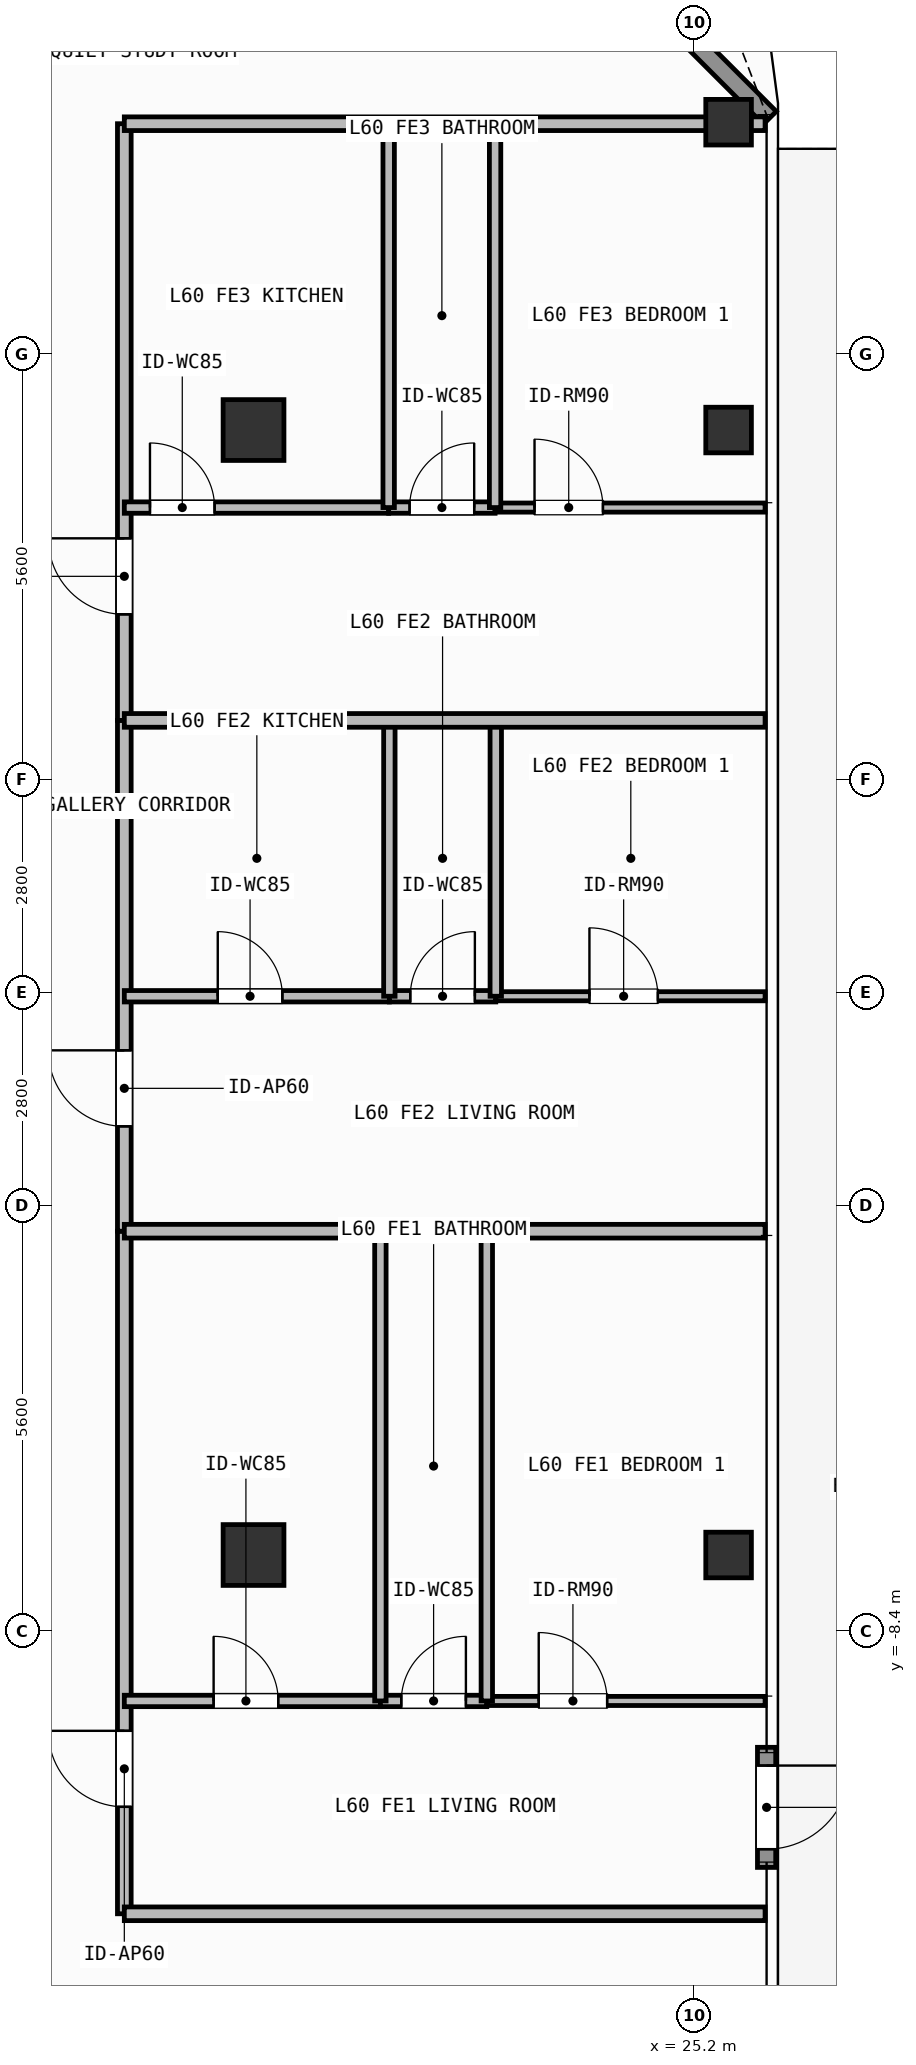
"""IFC4 building model, lengths in metres.
Left out: names, types, materials, properties, quantities, classifications, styles, units other than length and angle.
Written with IfcOpenShell. Run it as: python <this file> out.ifc"""

import sys

from ifc_helpers import new_model, si_unit, direction, frame, frame_2d, origin, origin_2d, place, context, subcontext, project, spatial, rectangle, hollow_rectangle, extrude, element, fill, save


model = new_model("IFC4")
c1 = context("Model", 3, precision=1e-05, world=origin(), true_north=direction((0.0, 1.0)))
c2 = subcontext(c1, "Body", "Model", "MODEL_VIEW")
j1 = project(units=[si_unit("LENGTHUNIT", "METRE"), si_unit("PLANEANGLEUNIT", "RADIAN")], contexts=[c1])
p1 = place(None, origin())
s1 = spatial("IfcSite", under=j1, at=p1, CompositionType="ELEMENT")
p2 = place(p1, origin())
s2 = spatial("IfcBuilding", under=s1, at=p2, CompositionType="ELEMENT")
p3 = place(p2, frame((0.0, 0.0, 246.9)))
s3 = spatial("IfcBuildingStorey", under=s2, at=p3, CompositionType="ELEMENT", Elevation=246.9)
for number, where, z_axis, x_axis in (
    (1, (19.4, -7.4, 0.0), (0.0, 0.0, 1.0), (1.0, 0.0, 0.0)),
    (2, (19.4, 7.4, 0.0), (0.0, 0.0, 1.0), (1.0, 0.0, 0.0)),
):
    element("IfcColumn", number, at=place(p3, frame(where, z_axis=z_axis, x_axis=x_axis)), inside=s3, PredefinedType="COLUMN", context=c2, shape_type="SweptSolid", body=[
        extrude(hollow_rectangle(XDim=0.8, YDim=0.8, WallThickness=0.036, at=origin_2d()), origin(), (0.0, 0.0, 1.0), 3.9),
    ])
for number, where, z_axis, x_axis in (
    (3, (25.65, 11.45, 0.0), (0.0, 0.0, 1.0), (1.0, 0.0, 0.0)),
    (4, (25.65, -7.4, 0.0), (0.0, 0.0, 1.0), (1.0, 0.0, 0.0)),
    (5, (25.65, 7.4, 0.0), (0.0, 0.0, 1.0), (1.0, 0.0, 0.0)),
):
    element("IfcColumn", number, at=place(p3, frame(where, z_axis=z_axis, x_axis=x_axis)), inside=s3, PredefinedType="COLUMN", context=c2, shape_type="SweptSolid", body=[
        extrude(hollow_rectangle(XDim=0.6, YDim=0.6, WallThickness=0.028, at=origin_2d()), origin(), (0.0, 0.0, 1.0), 3.9),
    ])
p4 = place(p3, frame((26.15, -9.93, 0.0), z_axis=(0.0, 0.0, 1.0), x_axis=(0.0, -1.0, 0.0)))
e6 = element("IfcWall", 6, at=p4, inside=s3, PredefinedType="SOLIDWALL", context=c2, shape_type="SweptSolid", body=[
    extrude(rectangle(XDim=1.58, YDim=0.24, at=frame_2d((0.79, 0.0))), origin(), (0.0, 0.0, 1.0), 3.68),
])
p5 = place(p4, frame((0.24, 0.0, 0.0)))
e7 = element("IfcOpeningElement", 7, at=p5, cuts=e6, PredefinedType="OPENING", context=c2, shape_type="SweptSolid", body=[
    extrude(rectangle(XDim=1.1, YDim=2.2, at=frame_2d((0.55, 1.1))), frame((0.0, 0.13, 0.0), z_axis=(0.0, -1.0, 0.0), x_axis=(1.0, 0.0, 0.0)), (0.0, 0.0, 1.0), 0.26),
])
p6 = place(p3, frame((21.808, 15.892, 0.0), z_axis=(0.0, 0.0, 1.0), x_axis=(0.707106781187, -0.707106781187, 0.0)))
e8 = element("IfcWall", 8, at=p6, inside=s3, PredefinedType="SOLIDWALL", context=c2, shape_type="SweptSolid", body=[
    extrude(rectangle(XDim=6.201, YDim=0.24, at=frame_2d((3.101, 0.0))), origin(), (0.0, 0.0, 1.0), 3.68),
])
p7 = place(p3, frame((17.7, -12.12, 0.0), z_axis=(0.0, 0.0, 1.0), x_axis=(0.0, 1.0, 0.0)))
e9 = element("IfcWall", 9, at=p7, inside=s3, PredefinedType="PARTITIONING", context=c2, shape_type="SweptSolid", body=[
    extrude(rectangle(XDim=8.98, YDim=0.18, at=frame_2d((4.49, 0.0))), origin(), (0.0, 0.0, 1.0), 3.68),
])
p8 = place(p7, frame((1.407, 0.0, 0.0)))
e10 = element("IfcOpeningElement", 10, at=p8, cuts=e9, PredefinedType="OPENING", context=c2, shape_type="SweptSolid", body=[
    extrude(rectangle(XDim=1.0, YDim=2.2, at=frame_2d((0.5, 1.1))), frame((0.0, 0.1, 0.0), z_axis=(0.0, -1.0, 0.0), x_axis=(1.0, 0.0, 0.0)), (0.0, 0.0, 1.0), 0.2),
])
p9 = place(p3, frame((17.7, -9.32, 0.0), z_axis=(0.0, 0.0, 1.0), x_axis=(1.0, 0.0, 0.0)))
e11 = element("IfcWall", 11, at=p9, inside=s3, PredefinedType="PARTITIONING", context=c2, shape_type="SweptSolid", body=[
    extrude(rectangle(XDim=3.369, YDim=0.15, at=frame_2d((1.685, 0.0))), origin(), (0.0, 0.0, 1.0), 3.68),
])
p10 = place(p9, frame((1.175, 0.0, 0.0)))
e12 = element("IfcOpeningElement", 12, at=p10, cuts=e11, PredefinedType="OPENING", context=c2, shape_type="SweptSolid", body=[
    extrude(rectangle(XDim=0.85, YDim=2.1, at=frame_2d((0.425, 1.05))), frame((0.0, 0.085, 0.0), z_axis=(0.0, -1.0, 0.0), x_axis=(1.0, 0.0, 0.0)), (0.0, 0.0, 1.0), 0.17),
])
p11 = place(p3, frame((21.069, -9.32, 0.0), z_axis=(0.0, 0.0, 1.0), x_axis=(1.0, 0.0, 0.0)))
e13 = element("IfcWall", 13, at=p11, inside=s3, PredefinedType="PARTITIONING", context=c2, shape_type="SweptSolid", body=[
    extrude(rectangle(XDim=1.4, YDim=0.15, at=frame_2d((0.7, 0.0))), origin(), (0.0, 0.0, 1.0), 3.68),
])
p12 = place(p11, frame((0.275, 0.0, 0.0)))
e14 = element("IfcOpeningElement", 14, at=p12, cuts=e13, PredefinedType="OPENING", context=c2, shape_type="SweptSolid", body=[
    extrude(rectangle(XDim=0.85, YDim=2.1, at=frame_2d((0.425, 1.05))), frame((0.0, 0.085, 0.0), z_axis=(0.0, -1.0, 0.0), x_axis=(1.0, 0.0, 0.0)), (0.0, 0.0, 1.0), 0.17),
])
p13 = place(p3, frame((22.469, -9.32, 0.0), z_axis=(0.0, 0.0, 1.0), x_axis=(1.0, 0.0, 0.0)))
e15 = element("IfcWall", 15, at=p13, inside=s3, PredefinedType="PARTITIONING", context=c2, shape_type="SweptSolid", body=[
    extrude(rectangle(XDim=3.661, YDim=0.12, at=frame_2d((1.831, 0.0))), origin(), (0.0, 0.0, 1.0), 3.68),
])
p14 = place(p13, frame((0.683, 0.0, 0.0)))
e16 = element("IfcOpeningElement", 16, at=p14, cuts=e15, PredefinedType="OPENING", context=c2, shape_type="SweptSolid", body=[
    extrude(rectangle(XDim=0.9, YDim=2.1, at=frame_2d((0.45, 1.05))), frame((0.0, 0.07, 0.0), z_axis=(0.0, -1.0, 0.0), x_axis=(1.0, 0.0, 0.0)), (0.0, 0.0, 1.0), 0.14),
])
p15 = place(p3, frame((17.7, -3.14, 0.0), z_axis=(0.0, 0.0, 1.0), x_axis=(0.0, 1.0, 0.0)))
e17 = element("IfcWall", 17, at=p15, inside=s3, PredefinedType="PARTITIONING", context=c2, shape_type="SweptSolid", body=[
    extrude(rectangle(XDim=6.72, YDim=0.18, at=frame_2d((3.36, 0.0))), origin(), (0.0, 0.0, 1.0), 3.68),
])
p16 = place(p15, frame((1.379, 0.0, 0.0)))
e18 = element("IfcOpeningElement", 18, at=p16, cuts=e17, PredefinedType="OPENING", context=c2, shape_type="SweptSolid", body=[
    extrude(rectangle(XDim=1.0, YDim=2.2, at=frame_2d((0.5, 1.1))), frame((0.0, 0.1, 0.0), z_axis=(0.0, -1.0, 0.0), x_axis=(1.0, 0.0, 0.0)), (0.0, 0.0, 1.0), 0.2),
])
p17 = place(p3, frame((17.7, -0.049, 0.0), z_axis=(0.0, 0.0, 1.0), x_axis=(1.0, 0.0, 0.0)))
e19 = element("IfcWall", 19, at=p17, inside=s3, PredefinedType="PARTITIONING", context=c2, shape_type="SweptSolid", body=[
    extrude(rectangle(XDim=3.487, YDim=0.15, at=frame_2d((1.744, 0.0))), origin(), (0.0, 0.0, 1.0), 3.68),
])
p18 = place(p17, frame((1.229, 0.0, 0.0)))
e20 = element("IfcOpeningElement", 20, at=p18, cuts=e19, PredefinedType="OPENING", context=c2, shape_type="SweptSolid", body=[
    extrude(rectangle(XDim=0.85, YDim=2.1, at=frame_2d((0.425, 1.05))), frame((0.0, 0.085, 0.0), z_axis=(0.0, -1.0, 0.0), x_axis=(1.0, 0.0, 0.0)), (0.0, 0.0, 1.0), 0.17),
])
p19 = place(p3, frame((21.187, -0.049, 0.0), z_axis=(0.0, 0.0, 1.0), x_axis=(1.0, 0.0, 0.0)))
e21 = element("IfcWall", 21, at=p19, inside=s3, PredefinedType="PARTITIONING", context=c2, shape_type="SweptSolid", body=[
    extrude(rectangle(XDim=1.4, YDim=0.15, at=frame_2d((0.7, 0.0))), origin(), (0.0, 0.0, 1.0), 3.68),
])
p20 = place(p19, frame((0.275, 0.0, 0.0)))
e22 = element("IfcOpeningElement", 22, at=p20, cuts=e21, PredefinedType="OPENING", context=c2, shape_type="SweptSolid", body=[
    extrude(rectangle(XDim=0.85, YDim=2.1, at=frame_2d((0.425, 1.05))), frame((0.0, 0.085, 0.0), z_axis=(0.0, -1.0, 0.0), x_axis=(1.0, 0.0, 0.0)), (0.0, 0.0, 1.0), 0.17),
])
p21 = place(p3, frame((22.587, -0.049, 0.0), z_axis=(0.0, 0.0, 1.0), x_axis=(1.0, 0.0, 0.0)))
e23 = element("IfcWall", 23, at=p21, inside=s3, PredefinedType="PARTITIONING", context=c2, shape_type="SweptSolid", body=[
    extrude(rectangle(XDim=3.543, YDim=0.12, at=frame_2d((1.771, 0.0))), origin(), (0.0, 0.0, 1.0), 3.68),
])
p22 = place(p21, frame((1.232, 0.0, 0.0)))
e24 = element("IfcOpeningElement", 24, at=p22, cuts=e23, PredefinedType="OPENING", context=c2, shape_type="SweptSolid", body=[
    extrude(rectangle(XDim=0.9, YDim=2.1, at=frame_2d((0.45, 1.05))), frame((0.0, 0.07, 0.0), z_axis=(0.0, -1.0, 0.0), x_axis=(1.0, 0.0, 0.0)), (0.0, 0.0, 1.0), 0.14),
])
p23 = place(p3, frame((17.7, 3.58, 0.0), z_axis=(0.0, 0.0, 1.0), x_axis=(0.0, 1.0, 0.0)))
e25 = element("IfcWall", 25, at=p23, inside=s3, PredefinedType="PARTITIONING", context=c2, shape_type="SweptSolid", body=[
    extrude(rectangle(XDim=7.85, YDim=0.18, at=frame_2d((3.925, 0.0))), origin(), (0.0, 0.0, 1.0), 3.68),
])
p24 = place(p23, frame((1.396, 0.0, 0.0)))
e26 = element("IfcOpeningElement", 26, at=p24, cuts=e25, PredefinedType="OPENING", context=c2, shape_type="SweptSolid", body=[
    extrude(rectangle(XDim=1.0, YDim=2.2, at=frame_2d((0.5, 1.1))), frame((0.0, 0.1, 0.0), z_axis=(0.0, -1.0, 0.0), x_axis=(1.0, 0.0, 0.0)), (0.0, 0.0, 1.0), 0.2),
])
p25 = place(p3, frame((17.7, 6.38, 0.0), z_axis=(0.0, 0.0, 1.0), x_axis=(1.0, 0.0, 0.0)))
e27 = element("IfcWall", 27, at=p25, inside=s3, PredefinedType="PARTITIONING", context=c2, shape_type="SweptSolid", body=[
    extrude(rectangle(XDim=3.478, YDim=0.15, at=frame_2d((1.739, 0.0))), origin(), (0.0, 0.0, 1.0), 3.68),
])
p26 = place(p25, frame((0.337, 0.0, 0.0)))
e28 = element("IfcOpeningElement", 28, at=p26, cuts=e27, PredefinedType="OPENING", context=c2, shape_type="SweptSolid", body=[
    extrude(rectangle(XDim=0.85, YDim=2.1, at=frame_2d((0.425, 1.05))), frame((0.0, 0.085, 0.0), z_axis=(0.0, -1.0, 0.0), x_axis=(1.0, 0.0, 0.0)), (0.0, 0.0, 1.0), 0.17),
])
p27 = place(p3, frame((21.178, 6.38, 0.0), z_axis=(0.0, 0.0, 1.0), x_axis=(1.0, 0.0, 0.0)))
e29 = element("IfcWall", 29, at=p27, inside=s3, PredefinedType="PARTITIONING", context=c2, shape_type="SweptSolid", body=[
    extrude(rectangle(XDim=1.4, YDim=0.15, at=frame_2d((0.7, 0.0))), origin(), (0.0, 0.0, 1.0), 3.68),
])
p28 = place(p27, frame((0.275, 0.0, 0.0)))
e30 = element("IfcOpeningElement", 30, at=p28, cuts=e29, PredefinedType="OPENING", context=c2, shape_type="SweptSolid", body=[
    extrude(rectangle(XDim=0.85, YDim=2.1, at=frame_2d((0.425, 1.05))), frame((0.0, 0.085, 0.0), z_axis=(0.0, -1.0, 0.0), x_axis=(1.0, 0.0, 0.0)), (0.0, 0.0, 1.0), 0.17),
])
p29 = place(p3, frame((22.578, 6.38, 0.0), z_axis=(0.0, 0.0, 1.0), x_axis=(1.0, 0.0, 0.0)))
e31 = element("IfcWall", 31, at=p29, inside=s3, PredefinedType="PARTITIONING", context=c2, shape_type="SweptSolid", body=[
    extrude(rectangle(XDim=3.552, YDim=0.12, at=frame_2d((1.776, 0.0))), origin(), (0.0, 0.0, 1.0), 3.68),
])
p30 = place(p29, frame((0.519, 0.0, 0.0)))
e32 = element("IfcOpeningElement", 32, at=p30, cuts=e31, PredefinedType="OPENING", context=c2, shape_type="SweptSolid", body=[
    extrude(rectangle(XDim=0.9, YDim=2.1, at=frame_2d((0.45, 1.05))), frame((0.0, 0.07, 0.0), z_axis=(0.0, -1.0, 0.0), x_axis=(1.0, 0.0, 0.0)), (0.0, 0.0, 1.0), 0.14),
])
for number, where, z_axis, x_axis in (
    (33, (21.069, -9.32, 0.0), (0.0, 0.0, 1.0), (0.0, 1.0, 0.0)),
    (34, (22.469, -9.32, 0.0), (0.0, 0.0, 1.0), (0.0, 1.0, 0.0)),
):
    element("IfcWall", number, at=place(p3, frame(where, z_axis=z_axis, x_axis=x_axis)), inside=s3, PredefinedType="PARTITIONING", context=c2, shape_type="SweptSolid", body=[
        extrude(rectangle(XDim=6.18, YDim=0.15, at=frame_2d((3.09, 0.0))), origin(), (0.0, 0.0, 1.0), 3.68),
    ])
for number, where, z_axis, x_axis in (
    (35, (21.187, -0.049, 0.0), (0.0, 0.0, 1.0), (0.0, 1.0, 0.0)),
    (36, (22.587, -0.049, 0.0), (0.0, 0.0, 1.0), (0.0, 1.0, 0.0)),
):
    element("IfcWall", number, at=place(p3, frame(where, z_axis=z_axis, x_axis=x_axis)), inside=s3, PredefinedType="PARTITIONING", context=c2, shape_type="SweptSolid", body=[
        extrude(rectangle(XDim=3.629, YDim=0.15, at=frame_2d((1.814, 0.0))), origin(), (0.0, 0.0, 1.0), 3.68),
    ])
p31 = place(p3, frame((17.7, -3.14, 0.0), z_axis=(0.0, 0.0, 1.0), x_axis=(1.0, 0.0, 0.0)))
e37 = element("IfcWall", 37, at=p31, inside=s3, PredefinedType="PARTITIONING", context=c2, shape_type="SweptSolid", body=[
    extrude(rectangle(XDim=8.43, YDim=0.18, at=frame_2d((4.215, 0.0))), origin(), (0.0, 0.0, 1.0), 3.68),
])
for number, where, z_axis, x_axis in (
    (38, (21.178, 6.38, 0.0), (0.0, 0.0, 1.0), (0.0, 1.0, 0.0)),
    (39, (22.578, 6.38, 0.0), (0.0, 0.0, 1.0), (0.0, 1.0, 0.0)),
):
    element("IfcWall", number, at=place(p3, frame(where, z_axis=z_axis, x_axis=x_axis)), inside=s3, PredefinedType="PARTITIONING", context=c2, shape_type="SweptSolid", body=[
        extrude(rectangle(XDim=5.05, YDim=0.15, at=frame_2d((2.525, 0.0))), origin(), (0.0, 0.0, 1.0), 3.68),
    ])
for number, where, z_axis, x_axis in (
    (40, (17.7, 3.58, 0.0), (0.0, 0.0, 1.0), (1.0, 0.0, 0.0)),
    (41, (17.7, -12.12, 0.0), (0.0, 0.0, 1.0), (1.0, 0.0, 0.0)),
):
    element("IfcWall", number, at=place(p3, frame(where, z_axis=z_axis, x_axis=x_axis)), inside=s3, PredefinedType="PARTITIONING", context=c2, shape_type="SweptSolid", body=[
        extrude(rectangle(XDim=8.43, YDim=0.18, at=frame_2d((4.215, 0.0))), origin(), (0.0, 0.0, 1.0), 3.68),
    ])
p32 = place(p3, frame((17.7, 11.43, 0.0), z_axis=(0.0, 0.0, 1.0), x_axis=(1.0, 0.0, 0.0)))
e42 = element("IfcWall", 42, at=p32, inside=s3, PredefinedType="PARTITIONING", context=c2, shape_type="SweptSolid", body=[
    extrude(rectangle(XDim=8.43, YDim=0.18, at=frame_2d((4.215, 0.0))), origin(), (0.0, 0.0, 1.0), 3.42),
])
p33 = place(p5, origin())
e43 = element("IfcDoor", 43, at=p33, inside=s3, OperationType="SINGLE_SWING_LEFT", PredefinedType="DOOR", context=c2, shape_type="SweptSolid", body=[
    extrude(rectangle(XDim=1.1, YDim=2.2, at=frame_2d((0.55, 1.1))), frame((0.0, 0.025, 0.0), z_axis=(0.0, -1.0, 0.0), x_axis=(1.0, 0.0, 0.0)), (0.0, 0.0, 1.0), 0.05),
])
fill(e7, e43)
p34 = place(p8, origin())
e44 = element("IfcDoor", 44, at=p34, inside=s3, OperationType="SINGLE_SWING_RIGHT", PredefinedType="DOOR", context=c2, shape_type="SweptSolid", body=[
    extrude(rectangle(XDim=1.0, YDim=2.2, at=frame_2d((0.5, 1.1))), frame((0.0, 0.025, 0.0), z_axis=(0.0, -1.0, 0.0), x_axis=(1.0, 0.0, 0.0)), (0.0, 0.0, 1.0), 0.05),
])
fill(e10, e44)
p35 = place(p10, origin())
e45 = element("IfcDoor", 45, at=p35, inside=s3, OperationType="SINGLE_SWING_LEFT", PredefinedType="DOOR", context=c2, shape_type="SweptSolid", body=[
    extrude(rectangle(XDim=0.85, YDim=2.1, at=frame_2d((0.425, 1.05))), frame((0.0, 0.025, 0.0), z_axis=(0.0, -1.0, 0.0), x_axis=(1.0, 0.0, 0.0)), (0.0, 0.0, 1.0), 0.05),
])
fill(e12, e45)
p36 = place(p12, origin())
e46 = element("IfcDoor", 46, at=p36, inside=s3, OperationType="SINGLE_SWING_RIGHT", PredefinedType="DOOR", context=c2, shape_type="SweptSolid", body=[
    extrude(rectangle(XDim=0.85, YDim=2.1, at=frame_2d((0.425, 1.05))), frame((0.0, 0.025, 0.0), z_axis=(0.0, -1.0, 0.0), x_axis=(1.0, 0.0, 0.0)), (0.0, 0.0, 1.0), 0.05),
])
fill(e14, e46)
p37 = place(p14, origin())
e47 = element("IfcDoor", 47, at=p37, inside=s3, OperationType="SINGLE_SWING_LEFT", PredefinedType="DOOR", context=c2, shape_type="SweptSolid", body=[
    extrude(rectangle(XDim=0.9, YDim=2.1, at=frame_2d((0.45, 1.05))), frame((0.0, 0.025, 0.0), z_axis=(0.0, -1.0, 0.0), x_axis=(1.0, 0.0, 0.0)), (0.0, 0.0, 1.0), 0.05),
])
fill(e16, e47)
p38 = place(p16, origin())
e48 = element("IfcDoor", 48, at=p38, inside=s3, OperationType="SINGLE_SWING_RIGHT", PredefinedType="DOOR", context=c2, shape_type="SweptSolid", body=[
    extrude(rectangle(XDim=1.0, YDim=2.2, at=frame_2d((0.5, 1.1))), frame((0.0, 0.025, 0.0), z_axis=(0.0, -1.0, 0.0), x_axis=(1.0, 0.0, 0.0)), (0.0, 0.0, 1.0), 0.05),
])
fill(e18, e48)
p39 = place(p18, origin())
e49 = element("IfcDoor", 49, at=p39, inside=s3, OperationType="SINGLE_SWING_LEFT", PredefinedType="DOOR", context=c2, shape_type="SweptSolid", body=[
    extrude(rectangle(XDim=0.85, YDim=2.1, at=frame_2d((0.425, 1.05))), frame((0.0, 0.025, 0.0), z_axis=(0.0, -1.0, 0.0), x_axis=(1.0, 0.0, 0.0)), (0.0, 0.0, 1.0), 0.05),
])
fill(e20, e49)
p40 = place(p20, origin())
e50 = element("IfcDoor", 50, at=p40, inside=s3, OperationType="SINGLE_SWING_RIGHT", PredefinedType="DOOR", context=c2, shape_type="SweptSolid", body=[
    extrude(rectangle(XDim=0.85, YDim=2.1, at=frame_2d((0.425, 1.05))), frame((0.0, 0.025, 0.0), z_axis=(0.0, -1.0, 0.0), x_axis=(1.0, 0.0, 0.0)), (0.0, 0.0, 1.0), 0.05),
])
fill(e22, e50)
p41 = place(p22, origin())
e51 = element("IfcDoor", 51, at=p41, inside=s3, OperationType="SINGLE_SWING_LEFT", PredefinedType="DOOR", context=c2, shape_type="SweptSolid", body=[
    extrude(rectangle(XDim=0.9, YDim=2.1, at=frame_2d((0.45, 1.05))), frame((0.0, 0.025, 0.0), z_axis=(0.0, -1.0, 0.0), x_axis=(1.0, 0.0, 0.0)), (0.0, 0.0, 1.0), 0.05),
])
fill(e24, e51)
p42 = place(p24, origin())
e52 = element("IfcDoor", 52, at=p42, inside=s3, OperationType="SINGLE_SWING_RIGHT", PredefinedType="DOOR", context=c2, shape_type="SweptSolid", body=[
    extrude(rectangle(XDim=1.0, YDim=2.2, at=frame_2d((0.5, 1.1))), frame((0.0, 0.025, 0.0), z_axis=(0.0, -1.0, 0.0), x_axis=(1.0, 0.0, 0.0)), (0.0, 0.0, 1.0), 0.05),
])
fill(e26, e52)
p43 = place(p26, origin())
e53 = element("IfcDoor", 53, at=p43, inside=s3, OperationType="SINGLE_SWING_LEFT", PredefinedType="DOOR", context=c2, shape_type="SweptSolid", body=[
    extrude(rectangle(XDim=0.85, YDim=2.1, at=frame_2d((0.425, 1.05))), frame((0.0, 0.025, 0.0), z_axis=(0.0, -1.0, 0.0), x_axis=(1.0, 0.0, 0.0)), (0.0, 0.0, 1.0), 0.05),
])
fill(e28, e53)
p44 = place(p28, origin())
e54 = element("IfcDoor", 54, at=p44, inside=s3, OperationType="SINGLE_SWING_RIGHT", PredefinedType="DOOR", context=c2, shape_type="SweptSolid", body=[
    extrude(rectangle(XDim=0.85, YDim=2.1, at=frame_2d((0.425, 1.05))), frame((0.0, 0.025, 0.0), z_axis=(0.0, -1.0, 0.0), x_axis=(1.0, 0.0, 0.0)), (0.0, 0.0, 1.0), 0.05),
])
fill(e30, e54)
p45 = place(p30, origin())
e55 = element("IfcDoor", 55, at=p45, inside=s3, OperationType="SINGLE_SWING_LEFT", PredefinedType="DOOR", context=c2, shape_type="SweptSolid", body=[
    extrude(rectangle(XDim=0.9, YDim=2.1, at=frame_2d((0.45, 1.05))), frame((0.0, 0.025, 0.0), z_axis=(0.0, -1.0, 0.0), x_axis=(1.0, 0.0, 0.0)), (0.0, 0.0, 1.0), 0.05),
])
fill(e32, e55)
save(model, sys.argv[1])
